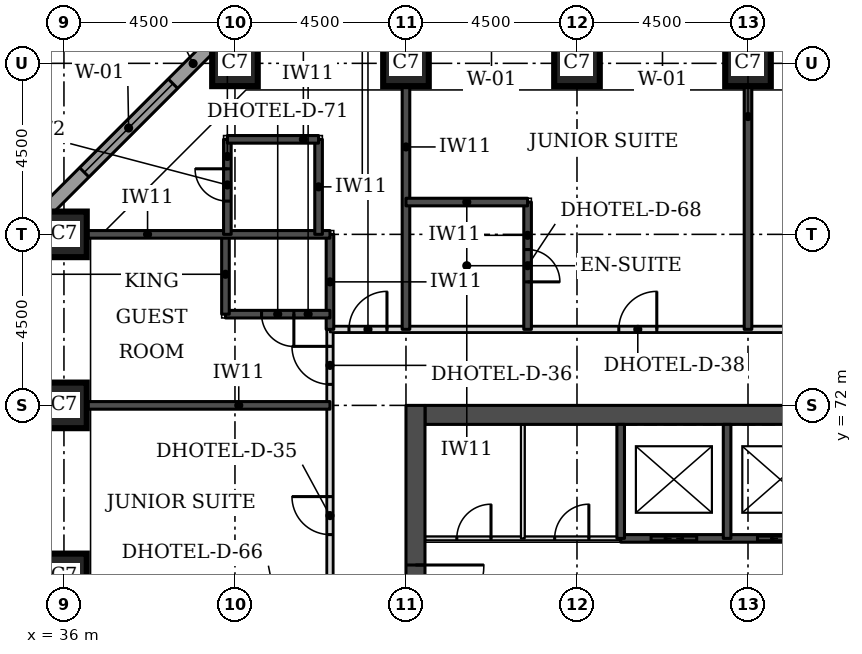
"""IFC4 building model, lengths in metres.
Left out: names, types, materials, properties, quantities, classifications, styles, units other than length and angle.
Written with IfcOpenShell. Run it as: python <this file> out.ifc"""

import sys

from ifc_helpers import new_model, si_unit, direction, frame, frame_2d, origin, origin_2d, place, context, subcontext, project, spatial, rectangle, extrude, element, fill, save


model = new_model("IFC4")
c1 = context("Model", 3, precision=1e-05, world=origin(), true_north=direction((0.0, 1.0)))
c2 = subcontext(c1, "Body", "Model", "MODEL_VIEW")
j1 = project(units=[si_unit("LENGTHUNIT", "METRE"), si_unit("PLANEANGLEUNIT", "RADIAN")], contexts=[c1])
p1 = place(None, origin())
s1 = spatial("IfcSite", under=j1, at=p1, CompositionType="ELEMENT")
p2 = place(p1, origin())
s2 = spatial("IfcBuilding", under=s1, at=p2, CompositionType="ELEMENT")
p3 = place(p2, frame((0.0, 0.0, 59.4)))
s3 = spatial("IfcBuildingStorey", under=s2, at=p3, CompositionType="ELEMENT", Elevation=59.4)
for number, where, z_axis, x_axis in (
    (1, (36.0, 67.5, 0.0), (0.0, 0.0, 1.0), (1.0, 0.0, 0.0)),
    (2, (36.0, 72.0, 0.0), (0.0, 0.0, 1.0), (1.0, 0.0, 0.0)),
    (3, (36.0, 76.5, 0.0), (0.0, 0.0, 1.0), (1.0, 0.0, 0.0)),
    (4, (40.5, 81.0, 0.0), (0.0, 0.0, 1.0), (1.0, 0.0, 0.0)),
    (5, (45.0, 81.0, 0.0), (0.0, 0.0, 1.0), (1.0, 0.0, 0.0)),
    (6, (49.5, 81.0, 0.0), (0.0, 0.0, 1.0), (1.0, 0.0, 0.0)),
    (7, (54.0, 81.0, 0.0), (0.0, 0.0, 1.0), (1.0, 0.0, 0.0)),
):
    element("IfcColumn", number, at=place(p3, frame(where, z_axis=z_axis, x_axis=x_axis)), inside=s3, PredefinedType="COLUMN", context=c2, shape_type="SweptSolid", body=[
        extrude(rectangle(XDim=1.2, YDim=1.2, at=origin_2d()), origin(), (0.0, 0.0, 1.0), 3.3),
    ])
p4 = place(p3, frame((45.5, 71.75, 0.0), z_axis=(0.0, 0.0, 1.0), x_axis=(1.0, 0.0, 0.0)))
e8 = element("IfcWall", 8, at=p4, inside=s3, PredefinedType="SHEAR", context=c2, shape_type="SweptSolid", body=[
    extrude(rectangle(XDim=21.5, YDim=0.5, at=frame_2d((10.75, 0.0))), origin(), (0.0, 0.0, 1.0), 3.3),
])
p5 = place(p3, frame((45.25, 49.5, 0.0), z_axis=(0.0, 0.0, 1.0), x_axis=(0.0, 1.0, 0.0)))
e9 = element("IfcWall", 9, at=p5, inside=s3, PredefinedType="SHEAR", context=c2, shape_type="SweptSolid", body=[
    extrude(rectangle(XDim=22.5, YDim=0.5, at=frame_2d((11.25, 0.0))), origin(), (0.0, 0.0, 1.0), 3.3),
])
p6 = place(p5, frame((4.2, 0.0, 0.0)))
e10 = element("IfcOpeningElement", 10, at=p6, cuts=e9, PredefinedType="OPENING", context=c2, shape_type="SweptSolid", body=[
    extrude(rectangle(XDim=1.8, YDim=2.1, at=frame_2d((0.9, 1.05))), frame((0.0, 0.26, 0.0), z_axis=(0.0, -1.0, 0.0), x_axis=(1.0, 0.0, 0.0)), (0.0, 0.0, 1.0), 0.52),
])
p7 = place(p5, frame((6.9, 0.0, 0.0)))
e11 = element("IfcOpeningElement", 11, at=p7, cuts=e9, PredefinedType="OPENING", context=c2, shape_type="SweptSolid", body=[
    extrude(rectangle(XDim=1.1, YDim=2.1, at=frame_2d((0.55, 1.05))), frame((0.0, 0.26, 0.0), z_axis=(0.0, -1.0, 0.0), x_axis=(1.0, 0.0, 0.0)), (0.0, 0.0, 1.0), 0.52),
])
p8 = place(p5, frame((13.6, 0.0, 0.0)))
e12 = element("IfcOpeningElement", 12, at=p8, cuts=e9, PredefinedType="OPENING", context=c2, shape_type="SweptSolid", body=[
    extrude(rectangle(XDim=1.1, YDim=2.1, at=frame_2d((0.55, 1.05))), frame((0.0, 0.26, 0.0), z_axis=(0.0, -1.0, 0.0), x_axis=(1.0, 0.0, 0.0)), (0.0, 0.0, 1.0), 0.52),
])
p9 = place(p5, frame((16.5, 0.0, 0.0)))
e13 = element("IfcOpeningElement", 13, at=p9, cuts=e9, PredefinedType="OPENING", context=c2, shape_type="SweptSolid", body=[
    extrude(rectangle(XDim=1.8, YDim=2.1, at=frame_2d((0.9, 1.05))), frame((0.0, 0.26, 0.0), z_axis=(0.0, -1.0, 0.0), x_axis=(1.0, 0.0, 0.0)), (0.0, 0.0, 1.0), 0.52),
])
p10 = place(p3, frame((40.23, 81.826, 0.0), z_axis=(0.0, 0.0, 1.0), x_axis=(-0.707106781187, -0.707106781187, 0.0)))
e14 = element("IfcWall", 14, at=p10, inside=s3, PredefinedType="STANDARD", context=c2, shape_type="SweptSolid", body=[
    extrude(rectangle(XDim=7.151, YDim=0.35, at=frame_2d((3.576, 0.0))), origin(), (0.0, 0.0, 1.0), 3.055),
])
p11 = place(p10, frame((1.926, 0.0, 0.8)))
e15 = element("IfcOpeningElement", 15, at=p11, cuts=e14, PredefinedType="OPENING", context=c2, shape_type="SweptSolid", body=[
    extrude(rectangle(XDim=3.3, YDim=1.5, at=frame_2d((1.65, 0.75))), frame((0.0, 0.185, 0.0), z_axis=(0.0, -1.0, 0.0), x_axis=(1.0, 0.0, 0.0)), (0.0, 0.0, 1.0), 0.37),
])
p12 = place(p3, frame((43.0, 57.35, 0.0), z_axis=(0.0, 0.0, 1.0), x_axis=(0.0, 1.0, 0.0)))
e16 = element("IfcWall", 16, at=p12, inside=s3, PredefinedType="PARTITIONING", context=c2, shape_type="SweptSolid", body=[
    extrude(rectangle(XDim=16.65, YDim=0.15, at=frame_2d((8.325, 0.0))), origin(), (0.0, 0.0, 1.0), 3.08),
])
p13 = place(p12, frame((11.25, 0.0, 0.0)))
e17 = element("IfcOpeningElement", 17, at=p13, cuts=e16, PredefinedType="OPENING", context=c2, shape_type="SweptSolid", body=[
    extrude(rectangle(XDim=1.0, YDim=2.1, at=frame_2d((0.5, 1.05))), frame((0.0, 0.085, 0.0), z_axis=(0.0, -1.0, 0.0), x_axis=(1.0, 0.0, 0.0)), (0.0, 0.0, 1.0), 0.17),
])
p14 = place(p12, frame((15.203, 0.0, 0.0)))
e18 = element("IfcOpeningElement", 18, at=p14, cuts=e16, PredefinedType="OPENING", context=c2, shape_type="SweptSolid", body=[
    extrude(rectangle(XDim=1.0, YDim=2.1, at=frame_2d((0.5, 1.05))), frame((0.0, 0.085, 0.0), z_axis=(0.0, -1.0, 0.0), x_axis=(1.0, 0.0, 0.0)), (0.0, 0.0, 1.0), 0.17),
])
p15 = place(p3, frame((43.0, 74.0, 0.0), z_axis=(0.0, 0.0, 1.0), x_axis=(1.0, 0.0, 0.0)))
e19 = element("IfcWall", 19, at=p15, inside=s3, PredefinedType="PARTITIONING", context=c2, shape_type="SweptSolid", body=[
    extrude(rectangle(XDim=26.5, YDim=0.15, at=frame_2d((13.25, 0.0))), origin(), (0.0, 0.0, 1.0), 3.08),
])
p16 = place(p15, frame((7.6, 0.0, 0.0)))
e20 = element("IfcOpeningElement", 20, at=p16, cuts=e19, PredefinedType="OPENING", context=c2, shape_type="SweptSolid", body=[
    extrude(rectangle(XDim=1.0, YDim=2.1, at=frame_2d((0.5, 1.05))), frame((0.0, 0.085, 0.0), z_axis=(0.0, -1.0, 0.0), x_axis=(1.0, 0.0, 0.0)), (0.0, 0.0, 1.0), 0.17),
])
p17 = place(p15, frame((13.65, 0.0, 0.0)))
e21 = element("IfcOpeningElement", 21, at=p17, cuts=e19, PredefinedType="OPENING", context=c2, shape_type="SweptSolid", body=[
    extrude(rectangle(XDim=1.0, YDim=2.1, at=frame_2d((0.5, 1.05))), frame((0.0, 0.085, 0.0), z_axis=(0.0, -1.0, 0.0), x_axis=(1.0, 0.0, 0.0)), (0.0, 0.0, 1.0), 0.17),
])
p18 = place(p15, frame((23.05, 0.0, 0.0)))
e22 = element("IfcOpeningElement", 22, at=p18, cuts=e19, PredefinedType="OPENING", context=c2, shape_type="SweptSolid", body=[
    extrude(rectangle(XDim=1.0, YDim=2.1, at=frame_2d((0.5, 1.05))), frame((0.0, 0.085, 0.0), z_axis=(0.0, -1.0, 0.0), x_axis=(1.0, 0.0, 0.0)), (0.0, 0.0, 1.0), 0.17),
])
p19 = place(p15, frame((0.5, 0.0, 0.0)))
e23 = element("IfcOpeningElement", 23, at=p19, cuts=e19, PredefinedType="OPENING", context=c2, shape_type="SweptSolid", body=[
    extrude(rectangle(XDim=1.0, YDim=2.1, at=frame_2d((0.5, 1.05))), frame((0.0, 0.085, 0.0), z_axis=(0.0, -1.0, 0.0), x_axis=(1.0, 0.0, 0.0)), (0.0, 0.0, 1.0), 0.17),
])
p20 = place(p15, frame((25.0, 0.0, 0.0)))
e24 = element("IfcOpeningElement", 24, at=p20, cuts=e19, PredefinedType="OPENING", context=c2, shape_type="SweptSolid", body=[
    extrude(rectangle(XDim=1.0, YDim=2.1, at=frame_2d((0.5, 1.05))), frame((0.0, 0.085, 0.0), z_axis=(0.0, -1.0, 0.0), x_axis=(1.0, 0.0, 0.0)), (0.0, 0.0, 1.0), 0.17),
])
p21 = place(p3, frame((36.6, 72.0, 0.0), z_axis=(0.0, 0.0, 1.0), x_axis=(1.0, 0.0, 0.0)))
e25 = element("IfcWall", 25, at=p21, inside=s3, PredefinedType="SOLIDWALL", context=c2, shape_type="SweptSolid", body=[
    extrude(rectangle(XDim=6.4, YDim=0.2, at=frame_2d((3.2, 0.0))), origin(), (0.0, 0.0, 1.0), 3.08),
])
p22 = place(p3, frame((43.0, 74.0, 0.0), z_axis=(0.0, 0.0, 1.0), x_axis=(0.0, 1.0, 0.0)))
e26 = element("IfcWall", 26, at=p22, inside=s3, PredefinedType="SOLIDWALL", context=c2, shape_type="SweptSolid", body=[
    extrude(rectangle(XDim=2.5, YDim=0.2, at=frame_2d((1.25, 0.0))), origin(), (0.0, 0.0, 1.0), 3.08),
])
p23 = place(p3, frame((45.0, 74.0, 0.0), z_axis=(0.0, 0.0, 1.0), x_axis=(0.0, 1.0, 0.0)))
e27 = element("IfcWall", 27, at=p23, inside=s3, PredefinedType="SOLIDWALL", context=c2, shape_type="SweptSolid", body=[
    extrude(rectangle(XDim=6.4, YDim=0.2, at=frame_2d((3.2, 0.0))), origin(), (0.0, 0.0, 1.0), 3.08),
])
p24 = place(p3, frame((48.2, 74.0, 0.0), z_axis=(0.0, 0.0, 1.0), x_axis=(0.0, 1.0, 0.0)))
e28 = element("IfcWall", 28, at=p24, inside=s3, PredefinedType="SOLIDWALL", context=c2, shape_type="SweptSolid", body=[
    extrude(rectangle(XDim=3.35, YDim=0.2, at=frame_2d((1.675, 0.0))), origin(), (0.0, 0.0, 1.0), 3.08),
])
p25 = place(p24, frame((1.25, 0.0, 0.0)))
e29 = element("IfcOpeningElement", 29, at=p25, cuts=e28, PredefinedType="OPENING", context=c2, shape_type="SweptSolid", body=[
    extrude(rectangle(XDim=0.85, YDim=2.1, at=frame_2d((0.425, 1.05))), frame((0.0, 0.11, 0.0), z_axis=(0.0, -1.0, 0.0), x_axis=(1.0, 0.0, 0.0)), (0.0, 0.0, 1.0), 0.22),
])
p26 = place(p3, frame((54.0, 74.0, 0.0), z_axis=(0.0, 0.0, 1.0), x_axis=(0.0, 1.0, 0.0)))
e30 = element("IfcWall", 30, at=p26, inside=s3, PredefinedType="SOLIDWALL", context=c2, shape_type="SweptSolid", body=[
    extrude(rectangle(XDim=6.4, YDim=0.2, at=frame_2d((3.2, 0.0))), origin(), (0.0, 0.0, 1.0), 3.08),
])
p27 = place(p3, frame((40.25, 74.4, 0.0), z_axis=(0.0, 0.0, 1.0), x_axis=(1.0, 0.0, 0.0)))
e31 = element("IfcWall", 31, at=p27, inside=s3, PredefinedType="SOLIDWALL", context=c2, shape_type="SweptSolid", body=[
    extrude(rectangle(XDim=2.75, YDim=0.2, at=frame_2d((1.375, 0.0))), origin(), (0.0, 0.0, 1.0), 3.08),
])
p28 = place(p27, frame((0.95, 0.0, 0.0)))
e32 = element("IfcOpeningElement", 32, at=p28, cuts=e31, PredefinedType="OPENING", context=c2, shape_type="SweptSolid", body=[
    extrude(rectangle(XDim=0.85, YDim=2.1, at=frame_2d((0.425, 1.05))), frame((0.0, 0.11, 0.0), z_axis=(0.0, -1.0, 0.0), x_axis=(1.0, 0.0, 0.0)), (0.0, 0.0, 1.0), 0.22),
])
p29 = place(p3, frame((40.25, 74.4, 0.0), z_axis=(0.0, 0.0, 1.0), x_axis=(0.0, 1.0, 0.0)))
e33 = element("IfcWall", 33, at=p29, inside=s3, PredefinedType="SOLIDWALL", context=c2, shape_type="SweptSolid", body=[
    extrude(rectangle(XDim=2.1, YDim=0.2, at=frame_2d((1.05, 0.0))), origin(), (0.0, 0.0, 1.0), 3.08),
])
p30 = place(p3, frame((36.6, 76.5, 0.0), z_axis=(0.0, 0.0, 1.0), x_axis=(1.0, 0.0, 0.0)))
e34 = element("IfcWall", 34, at=p30, inside=s3, PredefinedType="SOLIDWALL", context=c2, shape_type="SweptSolid", body=[
    extrude(rectangle(XDim=6.4, YDim=0.2, at=frame_2d((3.2, 0.0))), origin(), (0.0, 0.0, 1.0), 3.08),
])
p31 = place(p3, frame((40.3, 76.5, 0.0), z_axis=(0.0, 0.0, 1.0), x_axis=(0.0, 1.0, 0.0)))
e35 = element("IfcWall", 35, at=p31, inside=s3, PredefinedType="SOLIDWALL", context=c2, shape_type="SweptSolid", body=[
    extrude(rectangle(XDim=2.5, YDim=0.2, at=frame_2d((1.25, 0.0))), origin(), (0.0, 0.0, 1.0), 3.08),
])
p32 = place(p31, frame((0.875, 0.0, 0.0)))
e36 = element("IfcOpeningElement", 36, at=p32, cuts=e35, PredefinedType="OPENING", context=c2, shape_type="SweptSolid", body=[
    extrude(rectangle(XDim=0.85, YDim=2.1, at=frame_2d((0.425, 1.05))), frame((0.0, 0.11, 0.0), z_axis=(0.0, -1.0, 0.0), x_axis=(1.0, 0.0, 0.0)), (0.0, 0.0, 1.0), 0.22),
])
p33 = place(p3, frame((42.7, 76.5, 0.0), z_axis=(0.0, 0.0, 1.0), x_axis=(0.0, 1.0, 0.0)))
e37 = element("IfcWall", 37, at=p33, inside=s3, PredefinedType="SOLIDWALL", context=c2, shape_type="SweptSolid", body=[
    extrude(rectangle(XDim=2.5, YDim=0.2, at=frame_2d((1.25, 0.0))), origin(), (0.0, 0.0, 1.0), 3.08),
])
p34 = place(p3, frame((45.0, 77.35, 0.0), z_axis=(0.0, 0.0, 1.0), x_axis=(1.0, 0.0, 0.0)))
e38 = element("IfcWall", 38, at=p34, inside=s3, PredefinedType="SOLIDWALL", context=c2, shape_type="SweptSolid", body=[
    extrude(rectangle(XDim=3.2, YDim=0.2, at=frame_2d((1.6, 0.0))), origin(), (0.0, 0.0, 1.0), 3.08),
])
p35 = place(p3, frame((40.3, 79.0, 0.0), z_axis=(0.0, 0.0, 1.0), x_axis=(1.0, 0.0, 0.0)))
e39 = element("IfcWall", 39, at=p35, inside=s3, PredefinedType="SOLIDWALL", context=c2, shape_type="SweptSolid", body=[
    extrude(rectangle(XDim=2.4, YDim=0.2, at=frame_2d((1.2, 0.0))), origin(), (0.0, 0.0, 1.0), 3.08),
])
p36 = place(p3, frame((45.5, 68.5, 0.0), z_axis=(0.0, 0.0, 1.0), x_axis=(1.0, 0.0, 0.0)))
e40 = element("IfcWall", 40, at=p36, inside=s3, PredefinedType="PARTITIONING", context=c2, shape_type="SweptSolid", body=[
    extrude(rectangle(XDim=5.15, YDim=0.1, at=frame_2d((2.575, 0.0))), origin(), (0.0, 0.0, 1.0), 3.08),
])
p37 = place(p36, frame((0.837, 0.0, 0.0)))
e41 = element("IfcOpeningElement", 41, at=p37, cuts=e40, PredefinedType="OPENING", context=c2, shape_type="SweptSolid", body=[
    extrude(rectangle(XDim=0.9, YDim=2.1, at=frame_2d((0.45, 1.05))), frame((0.0, 0.06, 0.0), z_axis=(0.0, -1.0, 0.0), x_axis=(1.0, 0.0, 0.0)), (0.0, 0.0, 1.0), 0.12),
])
p38 = place(p36, frame((3.413, 0.0, 0.0)))
e42 = element("IfcOpeningElement", 42, at=p38, cuts=e40, PredefinedType="OPENING", context=c2, shape_type="SweptSolid", body=[
    extrude(rectangle(XDim=0.9, YDim=2.1, at=frame_2d((0.45, 1.05))), frame((0.0, 0.06, 0.0), z_axis=(0.0, -1.0, 0.0), x_axis=(1.0, 0.0, 0.0)), (0.0, 0.0, 1.0), 0.12),
])
p39 = place(p3, frame((50.65, 68.5, 0.0), z_axis=(0.0, 0.0, 1.0), x_axis=(1.0, 0.0, 0.0)))
e43 = element("IfcWall", 43, at=p39, inside=s3, PredefinedType="SOLIDWALL", context=c2, shape_type="SweptSolid", body=[
    extrude(rectangle(XDim=11.2, YDim=0.2, at=frame_2d((5.6, 0.0))), origin(), (0.0, 0.0, 1.0), 3.08),
])
p40 = place(p39, frame((0.8, 0.0, 0.0)))
e44 = element("IfcOpeningElement", 44, at=p40, cuts=e43, PredefinedType="OPENING", context=c2, shape_type="SweptSolid", body=[
    extrude(rectangle(XDim=1.2, YDim=2.1, at=frame_2d((0.6, 1.05))), frame((0.0, 0.11, 0.0), z_axis=(0.0, -1.0, 0.0), x_axis=(1.0, 0.0, 0.0)), (0.0, 0.0, 1.0), 0.22),
])
p41 = place(p39, frame((3.6, 0.0, 0.0)))
e45 = element("IfcOpeningElement", 45, at=p41, cuts=e43, PredefinedType="OPENING", context=c2, shape_type="SweptSolid", body=[
    extrude(rectangle(XDim=1.2, YDim=2.1, at=frame_2d((0.6, 1.05))), frame((0.0, 0.11, 0.0), z_axis=(0.0, -1.0, 0.0), x_axis=(1.0, 0.0, 0.0)), (0.0, 0.0, 1.0), 0.22),
])
p42 = place(p39, frame((6.4, 0.0, 0.0)))
e46 = element("IfcOpeningElement", 46, at=p42, cuts=e43, PredefinedType="OPENING", context=c2, shape_type="SweptSolid", body=[
    extrude(rectangle(XDim=1.2, YDim=2.1, at=frame_2d((0.6, 1.05))), frame((0.0, 0.11, 0.0), z_axis=(0.0, -1.0, 0.0), x_axis=(1.0, 0.0, 0.0)), (0.0, 0.0, 1.0), 0.22),
])
p43 = place(p39, frame((9.2, 0.0, 0.0)))
e47 = element("IfcOpeningElement", 47, at=p43, cuts=e43, PredefinedType="OPENING", context=c2, shape_type="SweptSolid", body=[
    extrude(rectangle(XDim=1.2, YDim=2.1, at=frame_2d((0.6, 1.05))), frame((0.0, 0.11, 0.0), z_axis=(0.0, -1.0, 0.0), x_axis=(1.0, 0.0, 0.0)), (0.0, 0.0, 1.0), 0.22),
])
p44 = place(p3, frame((48.075, 68.5, 0.0), z_axis=(0.0, 0.0, 1.0), x_axis=(0.0, 1.0, 0.0)))
e48 = element("IfcWall", 48, at=p44, inside=s3, PredefinedType="PARTITIONING", context=c2, shape_type="SweptSolid", body=[
    extrude(rectangle(XDim=3.0, YDim=0.1, at=frame_2d((1.5, 0.0))), origin(), (0.0, 0.0, 1.0), 3.08),
])
for number, where, z_axis, x_axis in (
    (49, (50.65, 68.5, 0.0), (0.0, 0.0, 1.0), (0.0, 1.0, 0.0)),
    (50, (53.45, 68.5, 0.0), (0.0, 0.0, 1.0), (0.0, 1.0, 0.0)),
):
    element("IfcWall", number, at=place(p3, frame(where, z_axis=z_axis, x_axis=x_axis)), inside=s3, PredefinedType="SOLIDWALL", context=c2, shape_type="SweptSolid", body=[
        extrude(rectangle(XDim=3.0, YDim=0.2, at=frame_2d((1.5, 0.0))), origin(), (0.0, 0.0, 1.0), 3.08),
    ])
p45 = place(p11, origin())
e51 = element("IfcWindow", 51, at=p45, inside=s3, PartitioningType="SINGLE_PANEL", PredefinedType="WINDOW", context=c2, shape_type="SweptSolid", body=[
    extrude(rectangle(XDim=3.3, YDim=1.5, at=frame_2d((1.65, 0.75))), frame((0.0, 0.085, 0.0), z_axis=(0.0, -1.0, 0.0), x_axis=(1.0, 0.0, 0.0)), (0.0, 0.0, 1.0), 0.06),
])
fill(e15, e51)
p46 = place(p13, origin())
e52 = element("IfcDoor", 52, at=p46, inside=s3, OperationType="SINGLE_SWING_RIGHT", PredefinedType="DOOR", context=c2, shape_type="SweptSolid", body=[
    extrude(rectangle(XDim=1.0, YDim=2.1, at=frame_2d((0.5, 1.05))), frame((0.0, 0.025, 0.0), z_axis=(0.0, -1.0, 0.0), x_axis=(1.0, 0.0, 0.0)), (0.0, 0.0, 1.0), 0.05),
])
fill(e17, e52)
p47 = place(p14, origin())
e53 = element("IfcDoor", 53, at=p47, inside=s3, OperationType="SINGLE_SWING_RIGHT", PredefinedType="DOOR", context=c2, shape_type="SweptSolid", body=[
    extrude(rectangle(XDim=1.0, YDim=2.1, at=frame_2d((0.5, 1.05))), frame((0.0, 0.025, 0.0), z_axis=(0.0, -1.0, 0.0), x_axis=(1.0, 0.0, 0.0)), (0.0, 0.0, 1.0), 0.05),
])
fill(e18, e53)
p48 = place(p28, frame((0.85, 0.0, 0.0), z_axis=(0.0, 0.0, 1.0), x_axis=(-1.0, 0.0, 0.0)))
e54 = element("IfcDoor", 54, at=p48, inside=s3, OperationType="SINGLE_SWING_LEFT", PredefinedType="DOOR", context=c2, shape_type="SweptSolid", body=[
    extrude(rectangle(XDim=0.85, YDim=2.1, at=frame_2d((0.425, 1.05))), frame((0.0, 0.025, 0.0), z_axis=(0.0, -1.0, 0.0), x_axis=(1.0, 0.0, 0.0)), (0.0, 0.0, 1.0), 0.05),
])
fill(e32, e54)
p49 = place(p16, origin())
e55 = element("IfcDoor", 55, at=p49, inside=s3, OperationType="SINGLE_SWING_RIGHT", PredefinedType="DOOR", context=c2, shape_type="SweptSolid", body=[
    extrude(rectangle(XDim=1.0, YDim=2.1, at=frame_2d((0.5, 1.05))), frame((0.0, 0.025, 0.0), z_axis=(0.0, -1.0, 0.0), x_axis=(1.0, 0.0, 0.0)), (0.0, 0.0, 1.0), 0.05),
])
fill(e20, e55)
p50 = place(p25, frame((0.85, 0.0, 0.0), z_axis=(0.0, 0.0, 1.0), x_axis=(-1.0, 0.0, 0.0)))
e56 = element("IfcDoor", 56, at=p50, inside=s3, OperationType="SINGLE_SWING_RIGHT", PredefinedType="DOOR", context=c2, shape_type="SweptSolid", body=[
    extrude(rectangle(XDim=0.85, YDim=2.1, at=frame_2d((0.425, 1.05))), frame((0.0, 0.025, 0.0), z_axis=(0.0, -1.0, 0.0), x_axis=(1.0, 0.0, 0.0)), (0.0, 0.0, 1.0), 0.05),
])
fill(e29, e56)
p51 = place(p19, origin())
e57 = element("IfcDoor", 57, at=p51, inside=s3, OperationType="SINGLE_SWING_RIGHT", PredefinedType="DOOR", context=c2, shape_type="SweptSolid", body=[
    extrude(rectangle(XDim=1.0, YDim=2.1, at=frame_2d((0.5, 1.05))), frame((0.0, 0.025, 0.0), z_axis=(0.0, -1.0, 0.0), x_axis=(1.0, 0.0, 0.0)), (0.0, 0.0, 1.0), 0.05),
])
fill(e23, e57)
p52 = place(p32, origin())
e58 = element("IfcDoor", 58, at=p52, inside=s3, OperationType="SINGLE_SWING_RIGHT", PredefinedType="DOOR", context=c2, shape_type="SweptSolid", body=[
    extrude(rectangle(XDim=0.85, YDim=2.1, at=frame_2d((0.425, 1.05))), frame((0.0, 0.025, 0.0), z_axis=(0.0, -1.0, 0.0), x_axis=(1.0, 0.0, 0.0)), (0.0, 0.0, 1.0), 0.05),
])
fill(e36, e58)
p53 = place(p40, origin())
e59 = element("IfcDoor", 59, at=p53, inside=s3, OperationType="DOUBLE_DOOR_SLIDING", PredefinedType="DOOR", context=c2, shape_type="SweptSolid", body=[
    extrude(rectangle(XDim=1.2, YDim=2.1, at=frame_2d((0.6, 1.05))), frame((0.0, 0.025, 0.0), z_axis=(0.0, -1.0, 0.0), x_axis=(1.0, 0.0, 0.0)), (0.0, 0.0, 1.0), 0.05),
])
fill(e44, e59)
p54 = place(p41, origin())
e60 = element("IfcDoor", 60, at=p54, inside=s3, OperationType="DOUBLE_DOOR_SLIDING", PredefinedType="DOOR", context=c2, shape_type="SweptSolid", body=[
    extrude(rectangle(XDim=1.2, YDim=2.1, at=frame_2d((0.6, 1.05))), frame((0.0, 0.025, 0.0), z_axis=(0.0, -1.0, 0.0), x_axis=(1.0, 0.0, 0.0)), (0.0, 0.0, 1.0), 0.05),
])
fill(e45, e60)
p55 = place(p9, frame((1.8, 0.0, 0.0), z_axis=(0.0, 0.0, 1.0), x_axis=(-1.0, 0.0, 0.0)))
e61 = element("IfcDoor", 61, at=p55, inside=s3, OperationType="SINGLE_SWING_LEFT", PredefinedType="DOOR", context=c2, shape_type="SweptSolid", body=[
    extrude(rectangle(XDim=1.8, YDim=2.1, at=frame_2d((0.9, 1.05))), frame((0.0, 0.025, 0.0), z_axis=(0.0, -1.0, 0.0), x_axis=(1.0, 0.0, 0.0)), (0.0, 0.0, 1.0), 0.05),
])
fill(e13, e61)
p56 = place(p37, origin())
e62 = element("IfcDoor", 62, at=p56, inside=s3, OperationType="SINGLE_SWING_RIGHT", PredefinedType="DOOR", context=c2, shape_type="SweptSolid", body=[
    extrude(rectangle(XDim=0.9, YDim=2.1, at=frame_2d((0.45, 1.05))), frame((0.0, 0.025, 0.0), z_axis=(0.0, -1.0, 0.0), x_axis=(1.0, 0.0, 0.0)), (0.0, 0.0, 1.0), 0.05),
])
fill(e41, e62)
p57 = place(p38, origin())
e63 = element("IfcDoor", 63, at=p57, inside=s3, OperationType="SINGLE_SWING_RIGHT", PredefinedType="DOOR", context=c2, shape_type="SweptSolid", body=[
    extrude(rectangle(XDim=0.9, YDim=2.1, at=frame_2d((0.45, 1.05))), frame((0.0, 0.025, 0.0), z_axis=(0.0, -1.0, 0.0), x_axis=(1.0, 0.0, 0.0)), (0.0, 0.0, 1.0), 0.05),
])
fill(e42, e63)
save(model, sys.argv[1])
